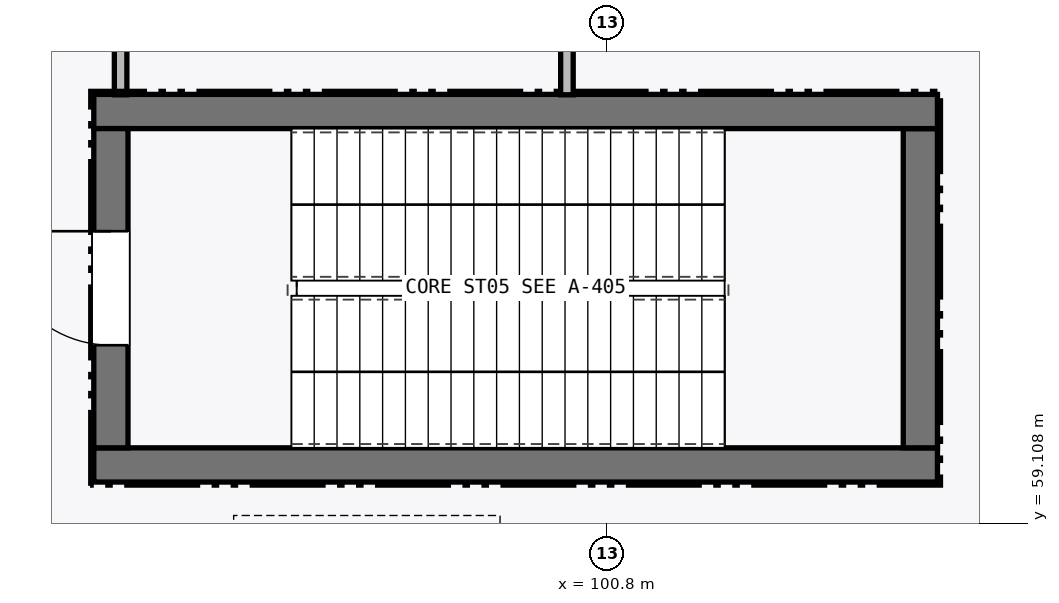
"""IFC4 building model, lengths in metres.
Left out: names, types, materials, properties, quantities, classifications, styles, units other than length and angle.
Written with IfcOpenShell. Run it as: python <this file> out.ifc"""

import sys

from ifc_helpers import new_model, si_unit, direction, frame, frame_2d, origin, place, context, subcontext, project, spatial, rectangle, extrude, element, fill, save


model = new_model("IFC4")
c1 = context("Model", 3, precision=1e-05, world=origin(), true_north=direction((0.0, 1.0)))
c2 = subcontext(c1, "Body", "Model", "MODEL_VIEW")
j1 = project(units=[si_unit("LENGTHUNIT", "METRE"), si_unit("PLANEANGLEUNIT", "RADIAN")], contexts=[c1])
p1 = place(None, origin())
s1 = spatial("IfcSite", under=j1, at=p1, CompositionType="ELEMENT")
p2 = place(p1, origin())
s2 = spatial("IfcBuilding", under=s1, at=p2, CompositionType="ELEMENT")
p3 = place(p2, origin())
s3 = spatial("IfcBuildingStorey", under=s2, at=p3, CompositionType="ELEMENT", Elevation=0.0)
p4 = place(p3, frame((94.05, 59.875, 0.0), z_axis=(0.0, 0.0, 1.0), x_axis=(1.0, 0.0, 0.0)))
e1 = element("IfcWall", 1, at=p4, inside=s3, PredefinedType="SHEAR", context=c2, shape_type="SweptSolid", body=[
    extrude(rectangle(XDim=11.1, YDim=0.45, at=frame_2d((5.55, 0.0))), origin(), (0.0, 0.0, 1.0), 5.745),
])
p5 = place(p3, frame((104.925, 60.1, 0.0), z_axis=(0.0, 0.0, 1.0), x_axis=(0.0, 1.0, 0.0)))
e2 = element("IfcWall", 2, at=p5, inside=s3, PredefinedType="SHEAR", context=c2, shape_type="SweptSolid", body=[
    extrude(rectangle(XDim=4.2, YDim=0.45, at=frame_2d((2.1, 0.0))), origin(), (0.0, 0.0, 1.0), 5.745),
])
p6 = place(p3, frame((105.15, 64.525, 0.0), z_axis=(0.0, 0.0, 1.0), x_axis=(-1.0, 0.0, 0.0)))
e3 = element("IfcWall", 3, at=p6, inside=s3, PredefinedType="SHEAR", context=c2, shape_type="SweptSolid", body=[
    extrude(rectangle(XDim=11.1, YDim=0.45, at=frame_2d((5.55, 0.0))), origin(), (0.0, 0.0, 1.0), 5.745),
])
p7 = place(p3, frame((94.275, 64.3, 0.0), z_axis=(0.0, 0.0, 1.0), x_axis=(0.0, -1.0, 0.0)))
e4 = element("IfcWall", 4, at=p7, inside=s3, PredefinedType="SHEAR", context=c2, shape_type="SweptSolid", body=[
    extrude(rectangle(XDim=4.2, YDim=0.45, at=frame_2d((2.1, 0.0))), origin(), (0.0, 0.0, 1.0), 5.745),
])
p8 = place(p7, frame((1.35, 0.0, 0.0)))
e5 = element("IfcOpeningElement", 5, at=p8, cuts=e4, PredefinedType="OPENING", context=c2, shape_type="SweptSolid", body=[
    extrude(rectangle(XDim=1.5, YDim=2.15, at=frame_2d((0.75, 1.075))), frame((0.0, 0.235, 0.0), z_axis=(0.0, -1.0, 0.0), x_axis=(1.0, 0.0, 0.0)), (0.0, 0.0, 1.0), 0.47),
])
p9 = place(p3, frame((100.275, 64.745, 0.0), z_axis=(0.0, 0.0, 1.0), x_axis=(0.0, 1.0, 0.0)))
e6 = element("IfcWall", 6, at=p9, inside=s3, PredefinedType="PARTITIONING", context=c2, shape_type="SweptSolid", body=[
    extrude(rectangle(XDim=11.682, YDim=0.165, at=frame_2d((5.841, 0.0))), origin(), (0.0, 0.0, 1.0), 5.745),
])
p10 = place(p3, frame((94.403, 76.627, 0.0), z_axis=(0.0, 0.0, 1.0), x_axis=(0.0, -1.0, 0.0)))
e7 = element("IfcWall", 7, at=p10, inside=s3, PredefinedType="PARTITIONING", context=c2, shape_type="SweptSolid", body=[
    extrude(rectangle(XDim=11.882, YDim=0.165, at=frame_2d((5.941, 0.0))), origin(), (0.0, 0.0, 1.0), 5.745),
])
p11 = place(p8, frame((1.5, 0.0, 0.0), z_axis=(0.0, 0.0, 1.0), x_axis=(-1.0, 0.0, 0.0)))
e8 = element("IfcDoor", 8, at=p11, inside=s3, OperationType="SINGLE_SWING_LEFT", PredefinedType="DOOR", context=c2, shape_type="SweptSolid", body=[
    extrude(rectangle(XDim=1.5, YDim=2.15, at=frame_2d((0.75, 1.075))), frame((0.0, 0.025, 0.0), z_axis=(0.0, -1.0, 0.0), x_axis=(1.0, 0.0, 0.0)), (0.0, 0.0, 1.0), 0.05),
])
fill(e5, e8)
save(model, sys.argv[1])
